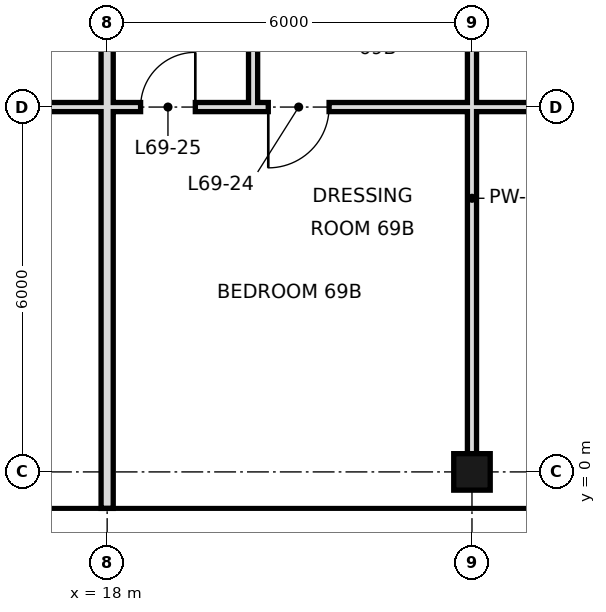
"""IFC4 building model, lengths in metres.
Left out: names, types, materials, properties, quantities, classifications, styles, units other than length and angle.
Written with IfcOpenShell. Run it as: python <this file> out.ifc"""

import sys

from ifc_helpers import new_model, si_unit, direction, frame, frame_2d, origin, origin_2d, place, context, subcontext, project, spatial, rectangle, hollow_rectangle, extrude, element, fill, save


model = new_model("IFC4")
c1 = context("Model", 3, precision=1e-05, world=origin(), true_north=direction((0.0, 1.0)))
c2 = subcontext(c1, "Body", "Model", "MODEL_VIEW")
j1 = project(units=[si_unit("LENGTHUNIT", "METRE"), si_unit("PLANEANGLEUNIT", "RADIAN")], contexts=[c1])
p1 = place(None, origin())
s1 = spatial("IfcSite", under=j1, at=p1, CompositionType="ELEMENT")
p2 = place(p1, origin())
s2 = spatial("IfcBuilding", under=s1, at=p2, CompositionType="ELEMENT")
p3 = place(p2, frame((0.0, 0.0, 294.4)))
s3 = spatial("IfcBuildingStorey", under=s2, at=p3, CompositionType="ELEMENT", Elevation=294.4)
p4 = place(p3, frame((24.0, 0.0, 0.0), z_axis=(0.0, 0.0, 1.0), x_axis=(1.0, 0.0, 0.0)))
e1 = element("IfcColumn", 1, at=p4, inside=s3, PredefinedType="COLUMN", context=c2, shape_type="SweptSolid", body=[
    extrude(hollow_rectangle(XDim=0.6, YDim=0.6, WallThickness=0.028, at=origin_2d()), origin(), (0.0, 0.0, 1.0), 3.6),
])
p5 = place(p3, frame((18.0, -0.6, 0.0), z_axis=(0.0, 0.0, 1.0), x_axis=(0.0, 1.0, 0.0)))
e2 = element("IfcWall", 2, at=p5, inside=s3, PredefinedType="SOLIDWALL", context=c2, shape_type="SweptSolid", body=[
    extrude(rectangle(XDim=19.3, YDim=0.2, at=frame_2d((9.65, 0.0))), origin(), (0.0, 0.0, 1.0), 2.72),
])
p6 = place(p3, frame((20.4, 6.0, 0.0), z_axis=(0.0, 0.0, 1.0), x_axis=(0.0, 1.0, 0.0)))
e3 = element("IfcWall", 3, at=p6, inside=s3, PredefinedType="PARTITIONING", context=c2, shape_type="SweptSolid", body=[
    extrude(rectangle(XDim=3.0, YDim=0.15, at=frame_2d((1.5, 0.0))), origin(), (0.0, 0.0, 1.0), 3.42),
])
p7 = place(p3, frame((24.0, 0.0, 0.0), z_axis=(0.0, 0.0, 1.0), x_axis=(0.0, 1.0, 0.0)))
e4 = element("IfcWall", 4, at=p7, inside=s3, PredefinedType="PARTITIONING", context=c2, shape_type="SweptSolid", body=[
    extrude(rectangle(XDim=9.0, YDim=0.15, at=frame_2d((4.5, 0.0))), origin(), (0.0, 0.0, 1.0), 2.72),
])
p8 = place(p3, frame((6.0, 6.0, 0.0), z_axis=(0.0, 0.0, 1.0), x_axis=(1.0, 0.0, 0.0)))
e5 = element("IfcWall", 5, at=p8, inside=s3, PredefinedType="PARTITIONING", context=c2, shape_type="SweptSolid", body=[
    extrude(rectangle(XDim=12.0, YDim=0.15, at=frame_2d((6.0, 0.0))), origin(), (0.0, 0.0, 1.0), 2.72),
])
p9 = place(p8, frame((5.1, 0.0, 0.0)))
e6 = element("IfcOpeningElement", 6, at=p9, cuts=e5, PredefinedType="OPENING", context=c2, shape_type="SweptSolid", body=[
    extrude(rectangle(XDim=1.8, YDim=2.4, at=frame_2d((0.9, 1.2))), frame((0.0, 0.085, 0.0), z_axis=(0.0, -1.0, 0.0), x_axis=(1.0, 0.0, 0.0)), (0.0, 0.0, 1.0), 0.17),
])
p10 = place(p3, frame((20.4, 6.0, 0.0), z_axis=(0.0, 0.0, 1.0), x_axis=(1.0, 0.0, 0.0)))
e7 = element("IfcWall", 7, at=p10, inside=s3, PredefinedType="PARTITIONING", context=c2, shape_type="SweptSolid", body=[
    extrude(rectangle(XDim=27.6, YDim=0.15, at=frame_2d((13.8, 0.0))), origin(), (0.0, 0.0, 1.0), 2.72),
])
p11 = place(p10, frame((0.25, 0.0, 0.0)))
e8 = element("IfcOpeningElement", 8, at=p11, cuts=e7, PredefinedType="OPENING", context=c2, shape_type="SweptSolid", body=[
    extrude(rectangle(XDim=1.0, YDim=2.4, at=frame_2d((0.5, 1.2))), frame((0.0, 0.085, 0.0), z_axis=(0.0, -1.0, 0.0), x_axis=(1.0, 0.0, 0.0)), (0.0, 0.0, 1.0), 0.17),
])
p12 = place(p10, frame((13.55, 0.0, 0.0)))
e9 = element("IfcOpeningElement", 9, at=p12, cuts=e7, PredefinedType="OPENING", context=c2, shape_type="SweptSolid", body=[
    extrude(rectangle(XDim=1.8, YDim=2.4, at=frame_2d((0.9, 1.2))), frame((0.0, 0.085, 0.0), z_axis=(0.0, -1.0, 0.0), x_axis=(1.0, 0.0, 0.0)), (0.0, 0.0, 1.0), 0.17),
])
p13 = place(p10, frame((21.1, 0.0, 0.0)))
e10 = element("IfcOpeningElement", 10, at=p13, cuts=e7, PredefinedType="OPENING", context=c2, shape_type="SweptSolid", body=[
    extrude(rectangle(XDim=1.0, YDim=2.4, at=frame_2d((0.5, 1.2))), frame((0.0, 0.085, 0.0), z_axis=(0.0, -1.0, 0.0), x_axis=(1.0, 0.0, 0.0)), (0.0, 0.0, 1.0), 0.17),
])
p14 = place(p3, frame((18.0, 6.0, 0.0), z_axis=(0.0, 0.0, 1.0), x_axis=(1.0, 0.0, 0.0)))
e11 = element("IfcWall", 11, at=p14, inside=s3, PredefinedType="PARTITIONING", context=c2, shape_type="SweptSolid", body=[
    extrude(rectangle(XDim=2.4, YDim=0.15, at=frame_2d((1.2, 0.0))), origin(), (0.0, 0.0, 1.0), 2.72),
])
p15 = place(p14, frame((0.55, 0.0, 0.0)))
e12 = element("IfcOpeningElement", 12, at=p15, cuts=e11, PredefinedType="OPENING", context=c2, shape_type="SweptSolid", body=[
    extrude(rectangle(XDim=0.9, YDim=2.4, at=frame_2d((0.45, 1.2))), frame((0.0, 0.085, 0.0), z_axis=(0.0, -1.0, 0.0), x_axis=(1.0, 0.0, 0.0)), (0.0, 0.0, 1.0), 0.17),
])
p16 = place(p11, frame((1.0, 0.0, 0.0), z_axis=(0.0, 0.0, 1.0), x_axis=(-1.0, 0.0, 0.0)))
e13 = element("IfcDoor", 13, at=p16, inside=s3, OperationType="SINGLE_SWING_RIGHT", PredefinedType="DOOR", context=c2, shape_type="SweptSolid", body=[
    extrude(rectangle(XDim=1.0, YDim=2.4, at=frame_2d((0.5, 1.2))), frame((0.0, 0.025, 0.0), z_axis=(0.0, -1.0, 0.0), x_axis=(1.0, 0.0, 0.0)), (0.0, 0.0, 1.0), 0.05),
])
fill(e8, e13)
p17 = place(p15, frame((0.9, 0.0, 0.0), z_axis=(0.0, 0.0, 1.0), x_axis=(-1.0, 0.0, 0.0)))
e14 = element("IfcDoor", 14, at=p17, inside=s3, OperationType="SINGLE_SWING_LEFT", PredefinedType="DOOR", context=c2, shape_type="SweptSolid", body=[
    extrude(rectangle(XDim=0.9, YDim=2.4, at=frame_2d((0.45, 1.2))), frame((0.0, 0.025, 0.0), z_axis=(0.0, -1.0, 0.0), x_axis=(1.0, 0.0, 0.0)), (0.0, 0.0, 1.0), 0.05),
])
fill(e12, e14)
save(model, sys.argv[1])
